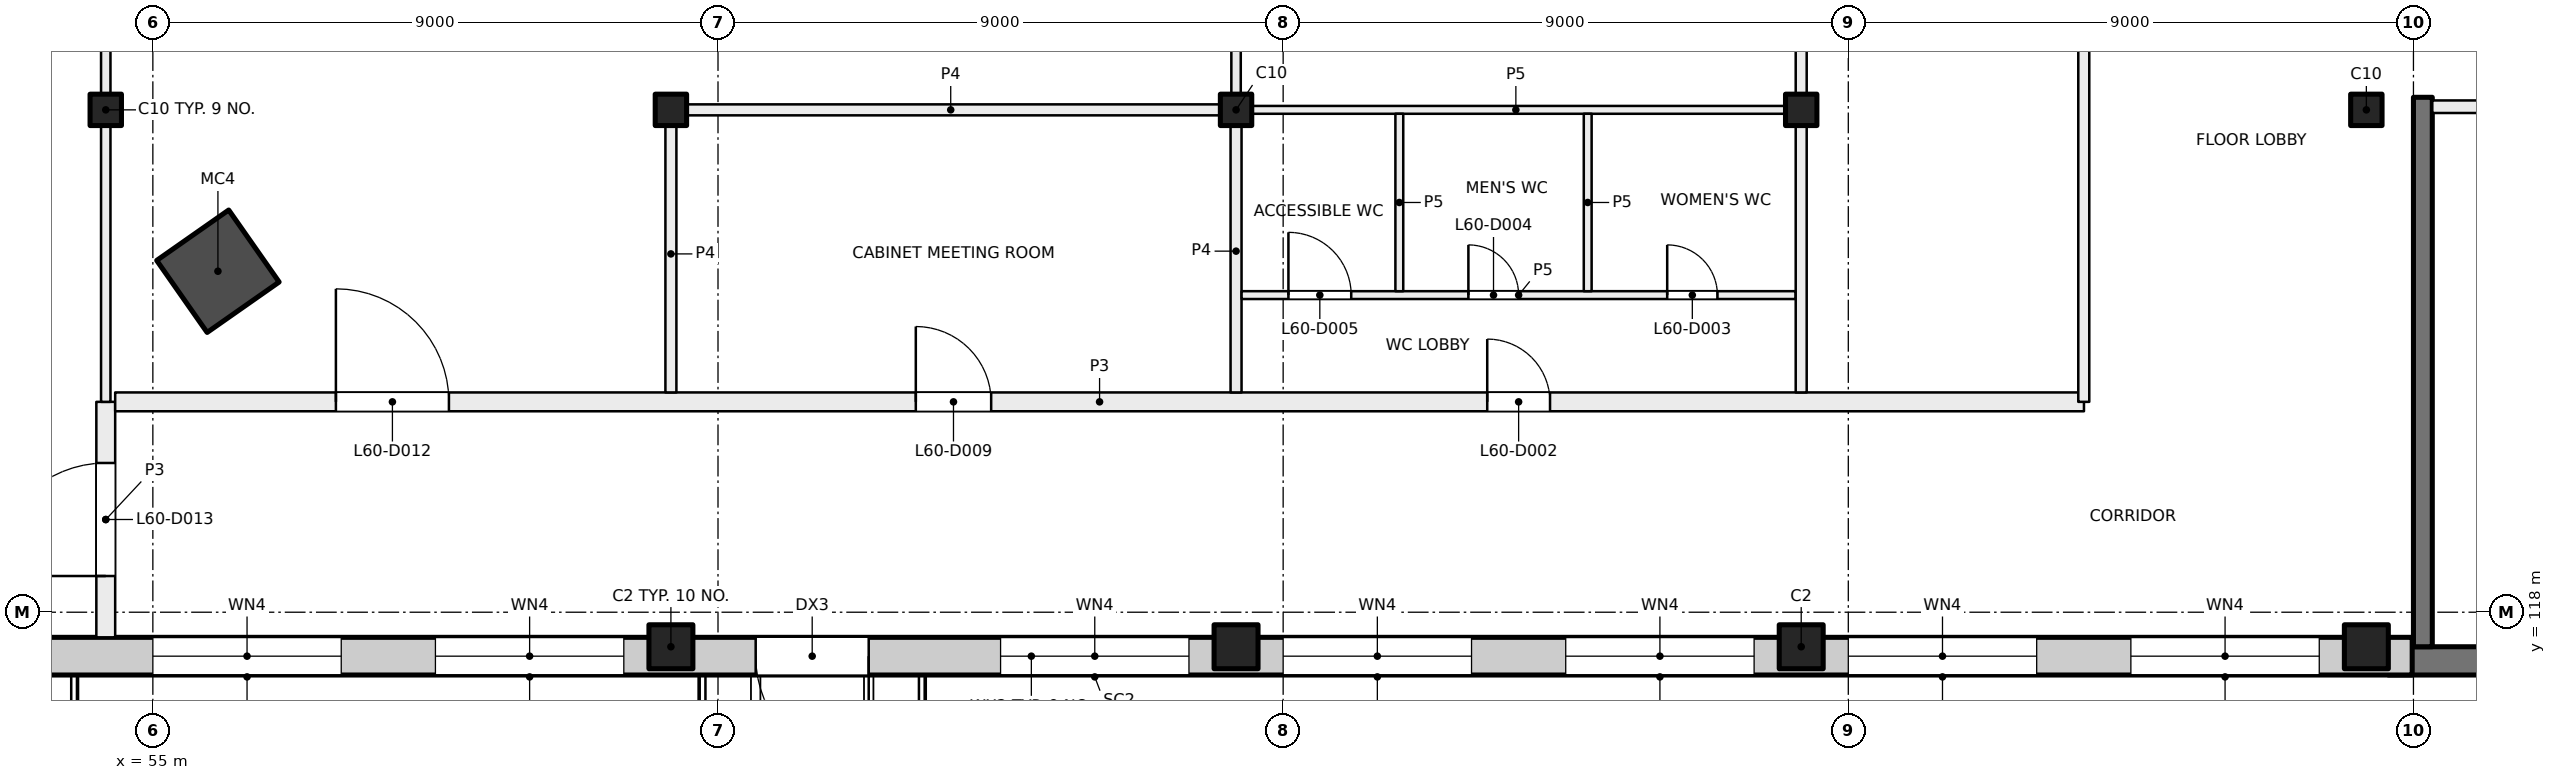
"""IFC4 building model, lengths in metres.
Left out: names, types, materials, properties, quantities, classifications, styles, units other than length and angle.
Written with IfcOpenShell. Run it as: python <this file> out.ifc"""

import sys

from ifc_helpers import new_model, si_unit, direction, frame, frame_2d, origin, origin_2d, place, context, subcontext, project, spatial, rectangle, hollow_rectangle, extrude, element, fill, save


model = new_model("IFC4")
c1 = context("Model", 3, precision=1e-05, world=origin(), true_north=direction((0.0, 1.0)))
c2 = subcontext(c1, "Body", "Model", "MODEL_VIEW")
j1 = project(units=[si_unit("LENGTHUNIT", "METRE"), si_unit("PLANEANGLEUNIT", "RADIAN")], contexts=[c1])
p1 = place(None, origin())
s1 = spatial("IfcSite", under=j1, at=p1, CompositionType="ELEMENT")
p2 = place(p1, origin())
s2 = spatial("IfcBuilding", under=s1, at=p2, CompositionType="ELEMENT")
p3 = place(p2, frame((0.0, 0.0, 253.5)))
s3 = spatial("IfcBuildingStorey", under=s2, at=p3, CompositionType="ELEMENT", Elevation=253.5)
p4 = place(p3, frame((56.036, 123.43, 0.0), z_axis=(0.0, 0.0, 1.0), x_axis=(0.573576436351, -0.819152044289, 0.0)))
e1 = element("IfcColumn", 1, at=p4, inside=s3, PredefinedType="COLUMN", context=c2, shape_type="SweptSolid", body=[
    extrude(hollow_rectangle(XDim=1.4, YDim=1.4, WallThickness=0.025, at=origin_2d()), origin(), (0.0, 0.0, 1.0), 4.0),
])
for number, where, z_axis, x_axis in (
    (2, (54.25, 126.0, 0.0), (0.0, 0.0, 1.0), (1.0, 0.0, 0.0)),
    (3, (63.25, 126.0, 0.0), (0.0, 0.0, 1.0), (1.0, 0.0, 0.0)),
    (4, (72.25, 126.0, 0.0), (0.0, 0.0, 1.0), (1.0, 0.0, 0.0)),
    (5, (81.25, 126.0, 0.0), (0.0, 0.0, 1.0), (1.0, 0.0, 0.0)),
    (6, (90.25, 126.0, 0.0), (0.0, 0.0, 1.0), (1.0, 0.0, 0.0)),
):
    element("IfcColumn", number, at=place(p3, frame(where, z_axis=z_axis, x_axis=x_axis)), inside=s3, PredefinedType="COLUMN", context=c2, shape_type="SweptSolid", body=[
        extrude(rectangle(XDim=0.5, YDim=0.5, at=origin_2d()), origin(), (0.0, 0.0, 1.0), 4.0),
    ])
for number, where, z_axis, x_axis in (
    (7, (63.25, 117.45, 0.0), (0.0, 0.0, 1.0), (1.0, 0.0, 0.0)),
    (8, (72.25, 117.45, 0.0), (0.0, 0.0, 1.0), (1.0, 0.0, 0.0)),
    (9, (81.25, 117.45, 0.0), (0.0, 0.0, 1.0), (1.0, 0.0, 0.0)),
    (10, (90.25, 117.45, 0.0), (0.0, 0.0, 1.0), (1.0, 0.0, 0.0)),
):
    element("IfcColumn", number, at=place(p3, frame(where, z_axis=z_axis, x_axis=x_axis)), inside=s3, PredefinedType="COLUMN", context=c2, shape_type="SweptSolid", body=[
        extrude(rectangle(XDim=0.7, YDim=0.7, at=origin_2d()), origin(), (0.0, 0.0, 1.0), 4.0),
    ])
p5 = place(p3, frame((99.6, 117.225, 0.0), z_axis=(0.0, 0.0, 1.0), x_axis=(-1.0, 0.0, 0.0)))
e11 = element("IfcWall", 11, at=p5, inside=s3, PredefinedType="SHEAR", context=c2, shape_type="SweptSolid", body=[
    extrude(rectangle(XDim=9.0, YDim=0.45, at=frame_2d((4.5, 0.0))), origin(), (0.0, 0.0, 1.0), 4.0),
])
p6 = place(p3, frame((91.15, 126.2, 0.0), z_axis=(0.0, 0.0, 1.0), x_axis=(0.0, -1.0, 0.0)))
e12 = element("IfcWall", 12, at=p6, inside=s3, PredefinedType="SHEAR", context=c2, shape_type="SweptSolid", body=[
    extrude(rectangle(XDim=8.75, YDim=0.3, at=frame_2d((4.375, 0.0))), origin(), (0.0, 0.0, 1.0), 4.0),
])
p7 = place(p3, frame((90.98, 117.3, 0.0), z_axis=(0.0, 0.0, 1.0), x_axis=(-1.0, 0.0, 0.0)))
e13 = element("IfcWall", 13, at=p7, inside=s3, PredefinedType="SOLIDWALL", context=c2, shape_type="SweptSolid", body=[
    extrude(rectangle(XDim=43.98, YDim=0.6, at=frame_2d((21.99, 0.0))), origin(), (0.0, 0.0, 1.0), 3.625),
])
p8 = place(p7, frame((1.48, 0.0, 0.9)))
e14 = element("IfcOpeningElement", 14, at=p8, cuts=e13, PredefinedType="OPENING", context=c2, shape_type="SweptSolid", body=[
    extrude(rectangle(XDim=3.0, YDim=2.4, at=frame_2d((1.5, 1.2))), frame((0.0, 0.31, 0.0), z_axis=(0.0, -1.0, 0.0), x_axis=(1.0, 0.0, 0.0)), (0.0, 0.0, 1.0), 0.62),
])
p9 = place(p7, frame((5.98, 0.0, 0.9)))
e15 = element("IfcOpeningElement", 15, at=p9, cuts=e13, PredefinedType="OPENING", context=c2, shape_type="SweptSolid", body=[
    extrude(rectangle(XDim=3.0, YDim=2.4, at=frame_2d((1.5, 1.2))), frame((0.0, 0.31, 0.0), z_axis=(0.0, -1.0, 0.0), x_axis=(1.0, 0.0, 0.0)), (0.0, 0.0, 1.0), 0.62),
])
p10 = place(p7, frame((10.48, 0.0, 0.9)))
e16 = element("IfcOpeningElement", 16, at=p10, cuts=e13, PredefinedType="OPENING", context=c2, shape_type="SweptSolid", body=[
    extrude(rectangle(XDim=3.0, YDim=2.4, at=frame_2d((1.5, 1.2))), frame((0.0, 0.31, 0.0), z_axis=(0.0, -1.0, 0.0), x_axis=(1.0, 0.0, 0.0)), (0.0, 0.0, 1.0), 0.62),
])
p11 = place(p7, frame((14.98, 0.0, 0.9)))
e17 = element("IfcOpeningElement", 17, at=p11, cuts=e13, PredefinedType="OPENING", context=c2, shape_type="SweptSolid", body=[
    extrude(rectangle(XDim=3.0, YDim=2.4, at=frame_2d((1.5, 1.2))), frame((0.0, 0.31, 0.0), z_axis=(0.0, -1.0, 0.0), x_axis=(1.0, 0.0, 0.0)), (0.0, 0.0, 1.0), 0.62),
])
p12 = place(p7, frame((19.48, 0.0, 0.9)))
e18 = element("IfcOpeningElement", 18, at=p12, cuts=e13, PredefinedType="OPENING", context=c2, shape_type="SweptSolid", body=[
    extrude(rectangle(XDim=3.0, YDim=2.4, at=frame_2d((1.5, 1.2))), frame((0.0, 0.31, 0.0), z_axis=(0.0, -1.0, 0.0), x_axis=(1.0, 0.0, 0.0)), (0.0, 0.0, 1.0), 0.62),
])
p13 = place(p7, frame((24.58, 0.0, 0.0)))
e19 = element("IfcOpeningElement", 19, at=p13, cuts=e13, PredefinedType="OPENING", context=c2, shape_type="SweptSolid", body=[
    extrude(rectangle(XDim=1.8, YDim=2.4, at=frame_2d((0.9, 1.2))), frame((0.0, 0.31, 0.0), z_axis=(0.0, -1.0, 0.0), x_axis=(1.0, 0.0, 0.0)), (0.0, 0.0, 1.0), 0.62),
])
p14 = place(p7, frame((28.48, 0.0, 0.9)))
e20 = element("IfcOpeningElement", 20, at=p14, cuts=e13, PredefinedType="OPENING", context=c2, shape_type="SweptSolid", body=[
    extrude(rectangle(XDim=3.0, YDim=2.4, at=frame_2d((1.5, 1.2))), frame((0.0, 0.31, 0.0), z_axis=(0.0, -1.0, 0.0), x_axis=(1.0, 0.0, 0.0)), (0.0, 0.0, 1.0), 0.62),
])
p15 = place(p7, frame((32.98, 0.0, 0.9)))
e21 = element("IfcOpeningElement", 21, at=p15, cuts=e13, PredefinedType="OPENING", context=c2, shape_type="SweptSolid", body=[
    extrude(rectangle(XDim=3.0, YDim=2.4, at=frame_2d((1.5, 1.2))), frame((0.0, 0.31, 0.0), z_axis=(0.0, -1.0, 0.0), x_axis=(1.0, 0.0, 0.0)), (0.0, 0.0, 1.0), 0.62),
])
p16 = place(p7, frame((38.08, 0.0, 0.0)))
e22 = element("IfcOpeningElement", 22, at=p16, cuts=e13, PredefinedType="OPENING", context=c2, shape_type="SweptSolid", body=[
    extrude(rectangle(XDim=1.8, YDim=2.4, at=frame_2d((0.9, 1.2))), frame((0.0, 0.31, 0.0), z_axis=(0.0, -1.0, 0.0), x_axis=(1.0, 0.0, 0.0)), (0.0, 0.0, 1.0), 0.62),
])
p17 = place(p3, frame((95.25, 126.05, 0.0), z_axis=(0.0, 0.0, 1.0), x_axis=(-1.0, 0.0, 0.0)))
e23 = element("IfcWall", 23, at=p17, inside=s3, PredefinedType="PARTITIONING", context=c2, shape_type="SweptSolid", body=[
    extrude(rectangle(XDim=3.95, YDim=0.2, at=frame_2d((1.975, 0.0))), origin(), (0.0, 0.0, 1.0), 3.625),
])
p18 = place(p17, frame((0.3, 0.0, 0.0)))
e24 = element("IfcOpeningElement", 24, at=p18, cuts=e23, PredefinedType="OPENING", context=c2, shape_type="SweptSolid", body=[
    extrude(rectangle(XDim=1.2, YDim=2.1, at=frame_2d((0.6, 1.05))), frame((0.0, 0.11, 0.0), z_axis=(0.0, -1.0, 0.0), x_axis=(1.0, 0.0, 0.0)), (0.0, 0.0, 1.0), 0.22),
])
p19 = place(p3, frame((54.25, 117.6, 0.0), z_axis=(0.0, 0.0, 1.0), x_axis=(0.0, 1.0, 0.0)))
e25 = element("IfcWall", 25, at=p19, inside=s3, PredefinedType="PARTITIONING", context=c2, shape_type="SweptSolid", body=[
    extrude(rectangle(XDim=3.75, YDim=0.3, at=frame_2d((1.875, 0.0))), origin(), (0.0, 0.0, 1.0), 3.625),
])
p20 = place(p19, frame((0.977, 0.0, 0.0)))
e26 = element("IfcOpeningElement", 26, at=p20, cuts=e25, PredefinedType="OPENING", context=c2, shape_type="SweptSolid", body=[
    extrude(rectangle(XDim=1.8, YDim=2.1, at=frame_2d((0.9, 1.05))), frame((0.0, 0.16, 0.0), z_axis=(0.0, -1.0, 0.0), x_axis=(1.0, 0.0, 0.0)), (0.0, 0.0, 1.0), 0.32),
])
p21 = place(p3, frame((54.4, 121.35, 0.0), z_axis=(0.0, 0.0, 1.0), x_axis=(1.0, 0.0, 0.0)))
e27 = element("IfcWall", 27, at=p21, inside=s3, PredefinedType="PARTITIONING", context=c2, shape_type="SweptSolid", body=[
    extrude(rectangle(XDim=31.353, YDim=0.3, at=frame_2d((15.677, 0.0))), origin(), (0.0, 0.0, 1.0), 3.625),
])
p22 = place(p21, frame((21.85, 0.0, 0.0)))
e28 = element("IfcOpeningElement", 28, at=p22, cuts=e27, PredefinedType="OPENING", context=c2, shape_type="SweptSolid", body=[
    extrude(rectangle(XDim=1.0, YDim=2.1, at=frame_2d((0.5, 1.05))), frame((0.0, 0.16, 0.0), z_axis=(0.0, -1.0, 0.0), x_axis=(1.0, 0.0, 0.0)), (0.0, 0.0, 1.0), 0.32),
])
p23 = place(p21, frame((12.75, 0.0, 0.0)))
e29 = element("IfcOpeningElement", 29, at=p23, cuts=e27, PredefinedType="OPENING", context=c2, shape_type="SweptSolid", body=[
    extrude(rectangle(XDim=1.2, YDim=2.1, at=frame_2d((0.6, 1.05))), frame((0.0, 0.16, 0.0), z_axis=(0.0, -1.0, 0.0), x_axis=(1.0, 0.0, 0.0)), (0.0, 0.0, 1.0), 0.32),
])
p24 = place(p21, frame((3.515, 0.0, 0.0)))
e30 = element("IfcOpeningElement", 30, at=p24, cuts=e27, PredefinedType="OPENING", context=c2, shape_type="SweptSolid", body=[
    extrude(rectangle(XDim=1.8, YDim=2.1, at=frame_2d((0.9, 1.05))), frame((0.0, 0.16, 0.0), z_axis=(0.0, -1.0, 0.0), x_axis=(1.0, 0.0, 0.0)), (0.0, 0.0, 1.0), 0.32),
])
p25 = place(p3, frame((54.25, 138.4, 0.0), z_axis=(0.0, 0.0, 1.0), x_axis=(0.0, -1.0, 0.0)))
e31 = element("IfcWall", 31, at=p25, inside=s3, PredefinedType="PARTITIONING", context=c2, shape_type="SweptSolid", body=[
    extrude(rectangle(XDim=17.05, YDim=0.15, at=frame_2d((8.525, 0.0))), origin(), (0.0, 0.0, 1.0), 3.625),
])
p26 = place(p3, frame((63.25, 125.912, 0.0), z_axis=(0.0, 0.0, 1.0), x_axis=(0.0, -1.0, 0.0)))
e32 = element("IfcWall", 32, at=p26, inside=s3, PredefinedType="PARTITIONING", context=c2, shape_type="SweptSolid", body=[
    extrude(rectangle(XDim=4.412, YDim=0.175, at=frame_2d((2.206, 0.0))), origin(), (0.0, 0.0, 1.0), 3.625),
])
p27 = place(p3, frame((72.25, 121.5, 0.0), z_axis=(0.0, 0.0, 1.0), x_axis=(0.0, 1.0, 0.0)))
e33 = element("IfcWall", 33, at=p27, inside=s3, PredefinedType="PARTITIONING", context=c2, shape_type="SweptSolid", body=[
    extrude(rectangle(XDim=4.5, YDim=0.175, at=frame_2d((2.25, 0.0))), origin(), (0.0, 0.0, 1.0), 3.625),
])
p28 = place(p3, frame((72.338, 123.05, 0.0), z_axis=(0.0, 0.0, 1.0), x_axis=(1.0, 0.0, 0.0)))
e34 = element("IfcWall", 34, at=p28, inside=s3, PredefinedType="PARTITIONING", context=c2, shape_type="SweptSolid", body=[
    extrude(rectangle(XDim=8.824, YDim=0.125, at=frame_2d((4.412, 0.0))), origin(), (0.0, 0.0, 1.0), 3.625),
])
p29 = place(p28, frame((6.778, 0.0, 0.0)))
e35 = element("IfcOpeningElement", 35, at=p29, cuts=e34, PredefinedType="OPENING", context=c2, shape_type="SweptSolid", body=[
    extrude(rectangle(XDim=0.8, YDim=2.1, at=frame_2d((0.4, 1.05))), frame((0.0, 0.073, 0.0), z_axis=(0.0, -1.0, 0.0), x_axis=(1.0, 0.0, 0.0)), (0.0, 0.0, 1.0), 0.145),
])
p30 = place(p28, frame((3.612, 0.0, 0.0)))
e36 = element("IfcOpeningElement", 36, at=p30, cuts=e34, PredefinedType="OPENING", context=c2, shape_type="SweptSolid", body=[
    extrude(rectangle(XDim=0.8, YDim=2.1, at=frame_2d((0.4, 1.05))), frame((0.0, 0.073, 0.0), z_axis=(0.0, -1.0, 0.0), x_axis=(1.0, 0.0, 0.0)), (0.0, 0.0, 1.0), 0.145),
])
p31 = place(p28, frame((0.746, 0.0, 0.0)))
e37 = element("IfcOpeningElement", 37, at=p31, cuts=e34, PredefinedType="OPENING", context=c2, shape_type="SweptSolid", body=[
    extrude(rectangle(XDim=1.0, YDim=2.1, at=frame_2d((0.5, 1.05))), frame((0.0, 0.073, 0.0), z_axis=(0.0, -1.0, 0.0), x_axis=(1.0, 0.0, 0.0)), (0.0, 0.0, 1.0), 0.145),
])
p32 = place(p3, frame((72.25, 126.0, 0.0), z_axis=(0.0, 0.0, 1.0), x_axis=(-1.0, 0.0, 0.0)))
e38 = element("IfcWall", 38, at=p32, inside=s3, PredefinedType="PARTITIONING", context=c2, shape_type="SweptSolid", body=[
    extrude(rectangle(XDim=9.088, YDim=0.175, at=frame_2d((4.544, 0.0))), origin(), (0.0, 0.0, 1.0), 3.625),
])
p33 = place(p3, frame((72.25, 126.0, 0.0), z_axis=(0.0, 0.0, 1.0), x_axis=(0.0, 1.0, 0.0)))
e39 = element("IfcWall", 39, at=p33, inside=s3, PredefinedType="PARTITIONING", context=c2, shape_type="SweptSolid", body=[
    extrude(rectangle(XDim=3.9, YDim=0.15, at=frame_2d((1.95, 0.0))), origin(), (0.0, 0.0, 1.0), 3.625),
])
p34 = place(p33, frame((1.05, 0.0, 0.0)))
e40 = element("IfcOpeningElement", 40, at=p34, cuts=e39, PredefinedType="OPENING", context=c2, shape_type="SweptSolid", body=[
    extrude(rectangle(XDim=1.8, YDim=2.1, at=frame_2d((0.9, 1.05))), frame((0.0, 0.085, 0.0), z_axis=(0.0, -1.0, 0.0), x_axis=(1.0, 0.0, 0.0)), (0.0, 0.0, 1.0), 0.17),
])
p35 = place(p3, frame((72.25, 126.0, 0.0), z_axis=(0.0, 0.0, 1.0), x_axis=(1.0, 0.0, 0.0)))
e41 = element("IfcWall", 41, at=p35, inside=s3, PredefinedType="PARTITIONING", context=c2, shape_type="SweptSolid", body=[
    extrude(rectangle(XDim=8.912, YDim=0.125, at=frame_2d((4.456, 0.0))), origin(), (0.0, 0.0, 1.0), 3.625),
])
for number, where, z_axis, x_axis in (
    (42, (74.85, 125.938, 0.0), (0.0, 0.0, 1.0), (0.0, -1.0, 0.0)),
    (43, (77.85, 125.938, 0.0), (0.0, 0.0, 1.0), (0.0, -1.0, 0.0)),
):
    element("IfcWall", number, at=place(p3, frame(where, z_axis=z_axis, x_axis=x_axis)), inside=s3, PredefinedType="PARTITIONING", context=c2, shape_type="SweptSolid", body=[
        extrude(rectangle(XDim=2.826, YDim=0.125, at=frame_2d((1.413, 0.0))), origin(), (0.0, 0.0, 1.0), 3.625),
    ])
p36 = place(p3, frame((81.25, 132.5, 0.0), z_axis=(0.0, 0.0, 1.0), x_axis=(0.0, -1.0, 0.0)))
e44 = element("IfcWall", 44, at=p36, inside=s3, PredefinedType="PARTITIONING", context=c2, shape_type="SweptSolid", body=[
    extrude(rectangle(XDim=11.0, YDim=0.175, at=frame_2d((5.5, 0.0))), origin(), (0.0, 0.0, 1.0), 3.625),
])
p37 = place(p36, frame((3.652, 0.0, 0.0)))
e45 = element("IfcOpeningElement", 45, at=p37, cuts=e44, PredefinedType="OPENING", context=c2, shape_type="SweptSolid", body=[
    extrude(rectangle(XDim=1.2, YDim=2.1, at=frame_2d((0.6, 1.05))), frame((0.0, 0.097, 0.0), z_axis=(0.0, -1.0, 0.0), x_axis=(1.0, 0.0, 0.0)), (0.0, 0.0, 1.0), 0.195),
])
p38 = place(p3, frame((85.75, 121.35, 0.0), z_axis=(0.0, 0.0, 1.0), x_axis=(0.0, 1.0, 0.0)))
e46 = element("IfcWall", 46, at=p38, inside=s3, PredefinedType="PARTITIONING", context=c2, shape_type="SweptSolid", body=[
    extrude(rectangle(XDim=17.05, YDim=0.175, at=frame_2d((8.525, 0.0))), origin(), (0.0, 0.0, 1.0), 3.625),
])
p39 = place(p8, origin())
e47 = element("IfcWindow", 47, at=p39, inside=s3, PartitioningType="SINGLE_PANEL", PredefinedType="WINDOW", context=c2, shape_type="SweptSolid", body=[
    extrude(rectangle(XDim=3.0, YDim=2.4, at=frame_2d((1.5, 1.2))), frame((0.0, 0.03, 0.0), z_axis=(0.0, -1.0, 0.0), x_axis=(1.0, 0.0, 0.0)), (0.0, 0.0, 1.0), 0.06),
])
fill(e14, e47)
p40 = place(p9, origin())
e48 = element("IfcWindow", 48, at=p40, inside=s3, PartitioningType="SINGLE_PANEL", PredefinedType="WINDOW", context=c2, shape_type="SweptSolid", body=[
    extrude(rectangle(XDim=3.0, YDim=2.4, at=frame_2d((1.5, 1.2))), frame((0.0, 0.03, 0.0), z_axis=(0.0, -1.0, 0.0), x_axis=(1.0, 0.0, 0.0)), (0.0, 0.0, 1.0), 0.06),
])
fill(e15, e48)
p41 = place(p10, origin())
e49 = element("IfcWindow", 49, at=p41, inside=s3, PartitioningType="SINGLE_PANEL", PredefinedType="WINDOW", context=c2, shape_type="SweptSolid", body=[
    extrude(rectangle(XDim=3.0, YDim=2.4, at=frame_2d((1.5, 1.2))), frame((0.0, 0.03, 0.0), z_axis=(0.0, -1.0, 0.0), x_axis=(1.0, 0.0, 0.0)), (0.0, 0.0, 1.0), 0.06),
])
fill(e16, e49)
p42 = place(p11, origin())
e50 = element("IfcWindow", 50, at=p42, inside=s3, PartitioningType="SINGLE_PANEL", PredefinedType="WINDOW", context=c2, shape_type="SweptSolid", body=[
    extrude(rectangle(XDim=3.0, YDim=2.4, at=frame_2d((1.5, 1.2))), frame((0.0, 0.03, 0.0), z_axis=(0.0, -1.0, 0.0), x_axis=(1.0, 0.0, 0.0)), (0.0, 0.0, 1.0), 0.06),
])
fill(e17, e50)
p43 = place(p12, origin())
e51 = element("IfcWindow", 51, at=p43, inside=s3, PartitioningType="SINGLE_PANEL", PredefinedType="WINDOW", context=c2, shape_type="SweptSolid", body=[
    extrude(rectangle(XDim=3.0, YDim=2.4, at=frame_2d((1.5, 1.2))), frame((0.0, 0.03, 0.0), z_axis=(0.0, -1.0, 0.0), x_axis=(1.0, 0.0, 0.0)), (0.0, 0.0, 1.0), 0.06),
])
fill(e18, e51)
p44 = place(p13, origin())
e52 = element("IfcDoor", 52, at=p44, inside=s3, OperationType="DOUBLE_DOOR_SINGLE_SWING", PredefinedType="DOOR", context=c2, shape_type="SweptSolid", body=[
    extrude(rectangle(XDim=1.8, YDim=2.4, at=frame_2d((0.9, 1.2))), frame((0.0, 0.025, 0.0), z_axis=(0.0, -1.0, 0.0), x_axis=(1.0, 0.0, 0.0)), (0.0, 0.0, 1.0), 0.05),
])
fill(e19, e52)
p45 = place(p14, origin())
e53 = element("IfcWindow", 53, at=p45, inside=s3, PartitioningType="SINGLE_PANEL", PredefinedType="WINDOW", context=c2, shape_type="SweptSolid", body=[
    extrude(rectangle(XDim=3.0, YDim=2.4, at=frame_2d((1.5, 1.2))), frame((0.0, 0.03, 0.0), z_axis=(0.0, -1.0, 0.0), x_axis=(1.0, 0.0, 0.0)), (0.0, 0.0, 1.0), 0.06),
])
fill(e20, e53)
p46 = place(p15, origin())
e54 = element("IfcWindow", 54, at=p46, inside=s3, PartitioningType="SINGLE_PANEL", PredefinedType="WINDOW", context=c2, shape_type="SweptSolid", body=[
    extrude(rectangle(XDim=3.0, YDim=2.4, at=frame_2d((1.5, 1.2))), frame((0.0, 0.03, 0.0), z_axis=(0.0, -1.0, 0.0), x_axis=(1.0, 0.0, 0.0)), (0.0, 0.0, 1.0), 0.06),
])
fill(e21, e54)
p47 = place(p22, origin())
e55 = element("IfcDoor", 55, at=p47, inside=s3, OperationType="SINGLE_SWING_LEFT", PredefinedType="DOOR", context=c2, shape_type="SweptSolid", body=[
    extrude(rectangle(XDim=1.0, YDim=2.1, at=frame_2d((0.5, 1.05))), frame((0.0, 0.025, 0.0), z_axis=(0.0, -1.0, 0.0), x_axis=(1.0, 0.0, 0.0)), (0.0, 0.0, 1.0), 0.05),
])
fill(e28, e55)
p48 = place(p29, origin())
e56 = element("IfcDoor", 56, at=p48, inside=s3, OperationType="SINGLE_SWING_RIGHT", PredefinedType="DOOR", context=c2, shape_type="SweptSolid", body=[
    extrude(rectangle(XDim=0.8, YDim=2.1, at=frame_2d((0.4, 1.05))), frame((0.0, 0.025, 0.0), z_axis=(0.0, -1.0, 0.0), x_axis=(1.0, 0.0, 0.0)), (0.0, 0.0, 1.0), 0.05),
])
fill(e35, e56)
p49 = place(p30, origin())
e57 = element("IfcDoor", 57, at=p49, inside=s3, OperationType="SINGLE_SWING_LEFT", PredefinedType="DOOR", context=c2, shape_type="SweptSolid", body=[
    extrude(rectangle(XDim=0.8, YDim=2.1, at=frame_2d((0.4, 1.05))), frame((0.0, 0.025, 0.0), z_axis=(0.0, -1.0, 0.0), x_axis=(1.0, 0.0, 0.0)), (0.0, 0.0, 1.0), 0.05),
])
fill(e36, e57)
p50 = place(p31, origin())
e58 = element("IfcDoor", 58, at=p50, inside=s3, OperationType="SINGLE_SWING_LEFT", PredefinedType="DOOR", context=c2, shape_type="SweptSolid", body=[
    extrude(rectangle(XDim=1.0, YDim=2.1, at=frame_2d((0.5, 1.05))), frame((0.0, 0.025, 0.0), z_axis=(0.0, -1.0, 0.0), x_axis=(1.0, 0.0, 0.0)), (0.0, 0.0, 1.0), 0.05),
])
fill(e37, e58)
p51 = place(p23, origin())
e59 = element("IfcDoor", 59, at=p51, inside=s3, OperationType="DOUBLE_DOOR_SINGLE_SWING", PredefinedType="DOOR", context=c2, shape_type="SweptSolid", body=[
    extrude(rectangle(XDim=1.2, YDim=2.1, at=frame_2d((0.6, 1.05))), frame((0.0, 0.025, 0.0), z_axis=(0.0, -1.0, 0.0), x_axis=(1.0, 0.0, 0.0)), (0.0, 0.0, 1.0), 0.05),
])
fill(e29, e59)
p52 = place(p24, origin())
e60 = element("IfcDoor", 60, at=p52, inside=s3, OperationType="DOUBLE_DOOR_SINGLE_SWING", PredefinedType="DOOR", context=c2, shape_type="SweptSolid", body=[
    extrude(rectangle(XDim=1.8, YDim=2.1, at=frame_2d((0.9, 1.05))), frame((0.0, 0.025, 0.0), z_axis=(0.0, -1.0, 0.0), x_axis=(1.0, 0.0, 0.0)), (0.0, 0.0, 1.0), 0.05),
])
fill(e30, e60)
p53 = place(p20, origin())
e61 = element("IfcDoor", 61, at=p53, inside=s3, OperationType="DOUBLE_DOOR_SINGLE_SWING", PredefinedType="DOOR", context=c2, shape_type="SweptSolid", body=[
    extrude(rectangle(XDim=1.8, YDim=2.1, at=frame_2d((0.9, 1.05))), frame((0.0, 0.025, 0.0), z_axis=(0.0, -1.0, 0.0), x_axis=(1.0, 0.0, 0.0)), (0.0, 0.0, 1.0), 0.05),
])
fill(e26, e61)
save(model, sys.argv[1])
